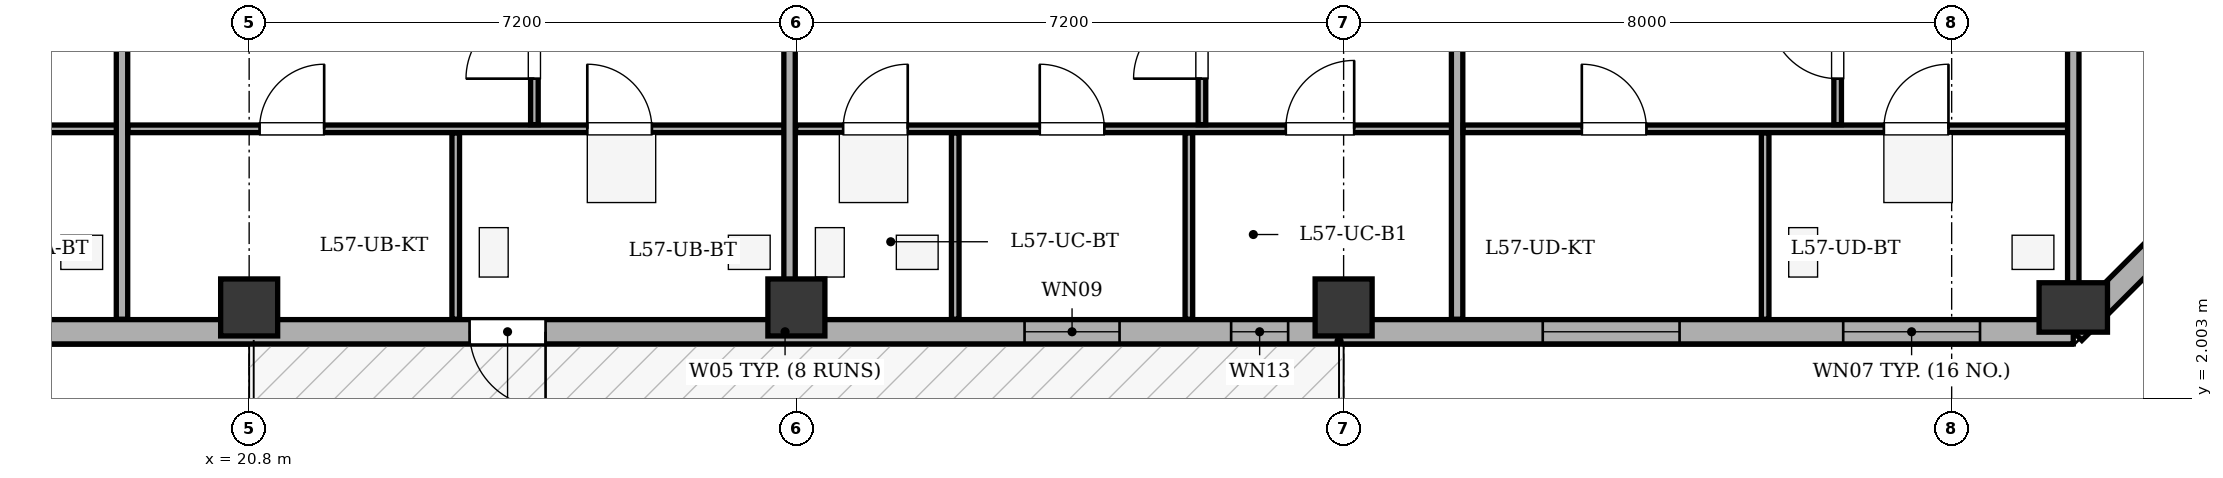
"""IFC4 building model, lengths in metres.
Left out: names, types, materials, properties, quantities, classifications, styles, units other than length and angle.
Written with IfcOpenShell. Run it as: python <this file> out.ifc"""

import sys

from ifc_helpers import new_model, si_unit, direction, frame, frame_2d, origin, origin_2d, place, context, subcontext, project, spatial, rectangle, extrude, element, fill, save


model = new_model("IFC4")
c1 = context("Model", 3, precision=1e-05, world=origin(), true_north=direction((0.0, 1.0)))
c2 = subcontext(c1, "Body", "Model", "MODEL_VIEW")
j1 = project(units=[si_unit("LENGTHUNIT", "METRE"), si_unit("PLANEANGLEUNIT", "RADIAN")], contexts=[c1])
p1 = place(None, origin())
s1 = spatial("IfcSite", under=j1, at=p1, CompositionType="ELEMENT")
p2 = place(p1, origin())
s2 = spatial("IfcBuilding", under=s1, at=p2, CompositionType="ELEMENT")
p3 = place(p2, frame((0.0, 0.0, 221.1)))
s3 = spatial("IfcBuildingStorey", under=s2, at=p3, CompositionType="ELEMENT", Elevation=221.1)
for number, where, z_axis, x_axis in (
    (1, (20.8, 3.2, 0.0), (0.0, 0.0, 1.0), (1.0, 0.0, 0.0)),
    (2, (28.0, 3.2, 0.0), (0.0, 0.0, 1.0), (1.0, 0.0, 0.0)),
    (3, (35.2, 3.2, 0.0), (0.0, 0.0, 1.0), (1.0, 0.0, 0.0)),
):
    element("IfcColumn", number, at=place(p3, frame(where, z_axis=z_axis, x_axis=x_axis)), inside=s3, PredefinedType="COLUMN", context=c2, shape_type="SweptSolid", body=[
        extrude(rectangle(XDim=0.75, YDim=0.75, at=origin_2d()), origin(), (0.0, 0.0, 1.0), 3.4),
    ])
p4 = place(p3, frame((44.8, 3.2, 0.0), z_axis=(0.0, 0.0, 1.0), x_axis=(1.0, 0.0, 0.0)))
e4 = element("IfcColumn", 4, at=p4, inside=s3, PredefinedType="COLUMN", context=c2, shape_type="SweptSolid", body=[
    extrude(rectangle(XDim=0.65, YDim=0.9, at=origin_2d()), origin(), (0.0, 0.0, 1.0), 3.4),
])
p5 = place(p3, frame((44.8, 2.88, 0.0), z_axis=(0.0, 0.0, 1.0), x_axis=(-1.0, 0.0, 0.0)))
e5 = element("IfcWall", 5, at=p5, inside=s3, PredefinedType="STANDARD", context=c2, shape_type="SweptSolid", body=[
    extrude(rectangle(XDim=36.0, YDim=0.32, at=frame_2d((18.0, 0.0))), origin(), (0.0, 0.0, 1.0), 2.725),
])
p6 = place(p5, frame((20.1, 0.0, 0.0)))
e6 = element("IfcOpeningElement", 6, at=p6, cuts=e5, PredefinedType="OPENING", context=c2, shape_type="SweptSolid", body=[
    extrude(rectangle(XDim=1.0, YDim=2.02, at=frame_2d((0.5, 1.01))), frame((0.0, 0.17, 0.0), z_axis=(0.0, -1.0, 0.0), x_axis=(1.0, 0.0, 0.0)), (0.0, 0.0, 1.0), 0.34),
])
p7 = place(p5, frame((1.227, 0.0, 0.75)))
e7 = element("IfcOpeningElement", 7, at=p7, cuts=e5, PredefinedType="OPENING", context=c2, shape_type="SweptSolid", body=[
    extrude(rectangle(XDim=1.8, YDim=1.7, at=frame_2d((0.9, 0.85))), frame((0.0, 0.17, 0.0), z_axis=(0.0, -1.0, 0.0), x_axis=(1.0, 0.0, 0.0)), (0.0, 0.0, 1.0), 0.34),
])
p8 = place(p5, frame((5.18, 0.0, 0.75)))
e8 = element("IfcOpeningElement", 8, at=p8, cuts=e5, PredefinedType="OPENING", context=c2, shape_type="SweptSolid", body=[
    extrude(rectangle(XDim=1.8, YDim=1.7, at=frame_2d((0.9, 0.85))), frame((0.0, 0.17, 0.0), z_axis=(0.0, -1.0, 0.0), x_axis=(1.0, 0.0, 0.0)), (0.0, 0.0, 1.0), 0.34),
])
p9 = place(p5, frame((12.548, 0.0, 0.75)))
e9 = element("IfcOpeningElement", 9, at=p9, cuts=e5, PredefinedType="OPENING", context=c2, shape_type="SweptSolid", body=[
    extrude(rectangle(XDim=1.25, YDim=1.7, at=frame_2d((0.625, 0.85))), frame((0.0, 0.17, 0.0), z_axis=(0.0, -1.0, 0.0), x_axis=(1.0, 0.0, 0.0)), (0.0, 0.0, 1.0), 0.34),
])
p10 = place(p5, frame((26.8, 0.0, 0.75)))
e10 = element("IfcOpeningElement", 10, at=p10, cuts=e5, PredefinedType="OPENING", context=c2, shape_type="SweptSolid", body=[
    extrude(rectangle(XDim=1.8, YDim=1.7, at=frame_2d((0.9, 0.85))), frame((0.0, 0.17, 0.0), z_axis=(0.0, -1.0, 0.0), x_axis=(1.0, 0.0, 0.0)), (0.0, 0.0, 1.0), 0.34),
])
p11 = place(p5, frame((30.854, 0.0, 0.75)))
e11 = element("IfcOpeningElement", 11, at=p11, cuts=e5, PredefinedType="OPENING", context=c2, shape_type="SweptSolid", body=[
    extrude(rectangle(XDim=1.8, YDim=1.7, at=frame_2d((0.9, 0.85))), frame((0.0, 0.17, 0.0), z_axis=(0.0, -1.0, 0.0), x_axis=(1.0, 0.0, 0.0)), (0.0, 0.0, 1.0), 0.34),
])
p12 = place(p5, frame((10.33, 0.0, 0.75)))
e12 = element("IfcOpeningElement", 12, at=p12, cuts=e5, PredefinedType="OPENING", context=c2, shape_type="SweptSolid", body=[
    extrude(rectangle(XDim=0.75, YDim=1.45, at=frame_2d((0.375, 0.725))), frame((0.0, 0.17, 0.0), z_axis=(0.0, -1.0, 0.0), x_axis=(1.0, 0.0, 0.0)), (0.0, 0.0, 1.0), 0.34),
])
p13 = place(p3, frame((49.12, 7.2, 0.0), z_axis=(0.0, 0.0, 1.0), x_axis=(-0.707106781187, -0.707106781187, 0.0)))
e13 = element("IfcWall", 13, at=p13, inside=s3, PredefinedType="STANDARD", context=c2, shape_type="SweptSolid", body=[
    extrude(rectangle(XDim=6.11, YDim=0.32, at=frame_2d((3.055, 0.0))), origin(), (0.0, 0.0, 1.0), 2.725),
])
p14 = place(p13, frame((2.355, 0.0, 0.75)))
e14 = element("IfcOpeningElement", 14, at=p14, cuts=e13, PredefinedType="OPENING", context=c2, shape_type="SweptSolid", body=[
    extrude(rectangle(XDim=1.4, YDim=1.65, at=frame_2d((0.7, 0.825))), frame((0.0, 0.17, 0.0), z_axis=(0.0, -1.0, 0.0), x_axis=(1.0, 0.0, 0.0)), (0.0, 0.0, 1.0), 0.34),
])
p15 = place(p3, frame((11.1, 5.55, 0.0), z_axis=(0.0, 0.0, 1.0), x_axis=(1.0, 0.0, 0.0)))
e15 = element("IfcWall", 15, at=p15, inside=s3, PredefinedType="PARTITIONING", context=c2, shape_type="SweptSolid", body=[
    extrude(rectangle(XDim=8.067, YDim=0.1, at=frame_2d((4.033, 0.0))), origin(), (0.0, 0.0, 1.0), 3.1),
])
p16 = place(p15, frame((1.562, 0.0, 0.0)))
e16 = element("IfcOpeningElement", 16, at=p16, cuts=e15, PredefinedType="OPENING", context=c2, shape_type="SweptSolid", body=[
    extrude(rectangle(XDim=0.85, YDim=2.05, at=frame_2d((0.425, 1.025))), frame((0.0, 0.06, 0.0), z_axis=(0.0, -1.0, 0.0), x_axis=(1.0, 0.0, 0.0)), (0.0, 0.0, 1.0), 0.12),
])
p17 = place(p15, frame((5.535, 0.0, 0.0)))
e17 = element("IfcOpeningElement", 17, at=p17, cuts=e15, PredefinedType="OPENING", context=c2, shape_type="SweptSolid", body=[
    extrude(rectangle(XDim=0.85, YDim=2.05, at=frame_2d((0.425, 1.025))), frame((0.0, 0.06, 0.0), z_axis=(0.0, -1.0, 0.0), x_axis=(1.0, 0.0, 0.0)), (0.0, 0.0, 1.0), 0.12),
])
p18 = place(p3, frame((19.127, 3.045, 0.0), z_axis=(0.0, 0.0, 1.0), x_axis=(0.0, 1.0, 0.0)))
e18 = element("IfcWall", 18, at=p18, inside=s3, PredefinedType="PARTITIONING", context=c2, shape_type="SweptSolid", body=[
    extrude(rectangle(XDim=15.255, YDim=0.15, at=frame_2d((7.627, 0.0))), origin(), (0.0, 0.0, 1.0), 3.1),
])
p19 = place(p3, frame((19.207, 5.55, 0.0), z_axis=(0.0, 0.0, 1.0), x_axis=(1.0, 0.0, 0.0)))
e19 = element("IfcWall", 19, at=p19, inside=s3, PredefinedType="PARTITIONING", context=c2, shape_type="SweptSolid", body=[
    extrude(rectangle(XDim=8.743, YDim=0.1, at=frame_2d((4.372, 0.0))), origin(), (0.0, 0.0, 1.0), 3.1),
])
p20 = place(p19, frame((1.73, 0.0, 0.0)))
e20 = element("IfcOpeningElement", 20, at=p20, cuts=e19, PredefinedType="OPENING", context=c2, shape_type="SweptSolid", body=[
    extrude(rectangle(XDim=0.85, YDim=2.05, at=frame_2d((0.425, 1.025))), frame((0.0, 0.06, 0.0), z_axis=(0.0, -1.0, 0.0), x_axis=(1.0, 0.0, 0.0)), (0.0, 0.0, 1.0), 0.12),
])
p21 = place(p19, frame((6.042, 0.0, 0.0)))
e21 = element("IfcOpeningElement", 21, at=p21, cuts=e19, PredefinedType="OPENING", context=c2, shape_type="SweptSolid", body=[
    extrude(rectangle(XDim=0.85, YDim=2.05, at=frame_2d((0.425, 1.025))), frame((0.0, 0.06, 0.0), z_axis=(0.0, -1.0, 0.0), x_axis=(1.0, 0.0, 0.0)), (0.0, 0.0, 1.0), 0.12),
])
p22 = place(p3, frame((24.553, 5.605, 0.0), z_axis=(0.0, 0.0, 1.0), x_axis=(0.0, 1.0, 0.0)))
e22 = element("IfcWall", 22, at=p22, inside=s3, PredefinedType="PARTITIONING", context=c2, shape_type="SweptSolid", body=[
    extrude(rectangle(XDim=12.695, YDim=0.1, at=frame_2d((6.348, 0.0))), origin(), (0.0, 0.0, 1.0), 3.1),
])
p23 = place(p22, frame((0.605, 0.0, 0.0)))
e23 = element("IfcOpeningElement", 23, at=p23, cuts=e22, PredefinedType="OPENING", context=c2, shape_type="SweptSolid", body=[
    extrude(rectangle(XDim=0.9, YDim=2.05, at=frame_2d((0.45, 1.025))), frame((0.0, 0.06, 0.0), z_axis=(0.0, -1.0, 0.0), x_axis=(1.0, 0.0, 0.0)), (0.0, 0.0, 1.0), 0.12),
])
p24 = place(p3, frame((23.518, 3.045, 0.0), z_axis=(0.0, 0.0, 1.0), x_axis=(0.0, 1.0, 0.0)))
e24 = element("IfcWall", 24, at=p24, inside=s3, PredefinedType="PARTITIONING", context=c2, shape_type="SweptSolid", body=[
    extrude(rectangle(XDim=2.45, YDim=0.1, at=frame_2d((1.225, 0.0))), origin(), (0.0, 0.0, 1.0), 3.1),
])
p25 = place(p3, frame((27.91, 3.045, 0.0), z_axis=(0.0, 0.0, 1.0), x_axis=(0.0, 1.0, 0.0)))
e25 = element("IfcWall", 25, at=p25, inside=s3, PredefinedType="PARTITIONING", context=c2, shape_type="SweptSolid", body=[
    extrude(rectangle(XDim=15.255, YDim=0.15, at=frame_2d((7.627, 0.0))), origin(), (0.0, 0.0, 1.0), 2.535),
])
p26 = place(p3, frame((27.99, 5.55, 0.0), z_axis=(0.0, 0.0, 1.0), x_axis=(1.0, 0.0, 0.0)))
e26 = element("IfcWall", 26, at=p26, inside=s3, PredefinedType="PARTITIONING", context=c2, shape_type="SweptSolid", body=[
    extrude(rectangle(XDim=8.743, YDim=0.1, at=frame_2d((4.372, 0.0))), origin(), (0.0, 0.0, 1.0), 3.1),
])
p27 = place(p26, frame((0.625, 0.0, 0.0)))
e27 = element("IfcOpeningElement", 27, at=p27, cuts=e26, PredefinedType="OPENING", context=c2, shape_type="SweptSolid", body=[
    extrude(rectangle(XDim=0.85, YDim=2.05, at=frame_2d((0.425, 1.025))), frame((0.0, 0.06, 0.0), z_axis=(0.0, -1.0, 0.0), x_axis=(1.0, 0.0, 0.0)), (0.0, 0.0, 1.0), 0.12),
])
p28 = place(p26, frame((3.212, 0.0, 0.0)))
e28 = element("IfcOpeningElement", 28, at=p28, cuts=e26, PredefinedType="OPENING", context=c2, shape_type="SweptSolid", body=[
    extrude(rectangle(XDim=0.85, YDim=2.05, at=frame_2d((0.425, 1.025))), frame((0.0, 0.06, 0.0), z_axis=(0.0, -1.0, 0.0), x_axis=(1.0, 0.0, 0.0)), (0.0, 0.0, 1.0), 0.12),
])
p29 = place(p26, frame((6.449, 0.0, 0.0)))
e29 = element("IfcOpeningElement", 29, at=p29, cuts=e26, PredefinedType="OPENING", context=c2, shape_type="SweptSolid", body=[
    extrude(rectangle(XDim=0.9, YDim=2.05, at=frame_2d((0.45, 1.025))), frame((0.0, 0.06, 0.0), z_axis=(0.0, -1.0, 0.0), x_axis=(1.0, 0.0, 0.0)), (0.0, 0.0, 1.0), 0.12),
])
p30 = place(p3, frame((33.336, 5.605, 0.0), z_axis=(0.0, 0.0, 1.0), x_axis=(0.0, 1.0, 0.0)))
e30 = element("IfcWall", 30, at=p30, inside=s3, PredefinedType="PARTITIONING", context=c2, shape_type="SweptSolid", body=[
    extrude(rectangle(XDim=12.695, YDim=0.1, at=frame_2d((6.348, 0.0))), origin(), (0.0, 0.0, 1.0), 3.1),
])
p31 = place(p30, frame((0.605, 0.0, 0.0)))
e31 = element("IfcOpeningElement", 31, at=p31, cuts=e30, PredefinedType="OPENING", context=c2, shape_type="SweptSolid", body=[
    extrude(rectangle(XDim=0.9, YDim=2.05, at=frame_2d((0.45, 1.025))), frame((0.0, 0.06, 0.0), z_axis=(0.0, -1.0, 0.0), x_axis=(1.0, 0.0, 0.0)), (0.0, 0.0, 1.0), 0.12),
])
for number, where, z_axis, x_axis in (
    (32, (30.09, 3.045, 0.0), (0.0, 0.0, 1.0), (0.0, 1.0, 0.0)),
    (33, (33.164, 3.045, 0.0), (0.0, 0.0, 1.0), (0.0, 1.0, 0.0)),
):
    element("IfcWall", number, at=place(p3, frame(where, z_axis=z_axis, x_axis=x_axis)), inside=s3, PredefinedType="PARTITIONING", context=c2, shape_type="SweptSolid", body=[
        extrude(rectangle(XDim=2.45, YDim=0.1, at=frame_2d((1.225, 0.0))), origin(), (0.0, 0.0, 1.0), 3.1),
    ])
p32 = place(p3, frame((36.693, 3.045, 0.0), z_axis=(0.0, 0.0, 1.0), x_axis=(0.0, 1.0, 0.0)))
e34 = element("IfcWall", 34, at=p32, inside=s3, PredefinedType="PARTITIONING", context=c2, shape_type="SweptSolid", body=[
    extrude(rectangle(XDim=15.255, YDim=0.15, at=frame_2d((7.627, 0.0))), origin(), (0.0, 0.0, 1.0), 2.725),
])
p33 = place(p3, frame((36.773, 5.55, 0.0), z_axis=(0.0, 0.0, 1.0), x_axis=(1.0, 0.0, 0.0)))
e35 = element("IfcWall", 35, at=p33, inside=s3, PredefinedType="PARTITIONING", context=c2, shape_type="SweptSolid", body=[
    extrude(rectangle(XDim=8.067, YDim=0.1, at=frame_2d((4.034, 0.0))), origin(), (0.0, 0.0, 1.0), 3.1),
])
p34 = place(p33, frame((1.561, 0.0, 0.0)))
e36 = element("IfcOpeningElement", 36, at=p34, cuts=e35, PredefinedType="OPENING", context=c2, shape_type="SweptSolid", body=[
    extrude(rectangle(XDim=0.85, YDim=2.05, at=frame_2d((0.425, 1.025))), frame((0.0, 0.06, 0.0), z_axis=(0.0, -1.0, 0.0), x_axis=(1.0, 0.0, 0.0)), (0.0, 0.0, 1.0), 0.12),
])
p35 = place(p33, frame((5.535, 0.0, 0.0)))
e37 = element("IfcOpeningElement", 37, at=p35, cuts=e35, PredefinedType="OPENING", context=c2, shape_type="SweptSolid", body=[
    extrude(rectangle(XDim=0.85, YDim=2.05, at=frame_2d((0.425, 1.025))), frame((0.0, 0.06, 0.0), z_axis=(0.0, -1.0, 0.0), x_axis=(1.0, 0.0, 0.0)), (0.0, 0.0, 1.0), 0.12),
])
p36 = place(p3, frame((41.7, 5.605, 0.0), z_axis=(0.0, 0.0, 1.0), x_axis=(0.0, 1.0, 0.0)))
e38 = element("IfcWall", 38, at=p36, inside=s3, PredefinedType="PARTITIONING", context=c2, shape_type="SweptSolid", body=[
    extrude(rectangle(XDim=12.695, YDim=0.1, at=frame_2d((6.348, 0.0))), origin(), (0.0, 0.0, 1.0), 3.1),
])
p37 = place(p36, frame((0.605, 0.0, 0.0)))
e39 = element("IfcOpeningElement", 39, at=p37, cuts=e38, PredefinedType="OPENING", context=c2, shape_type="SweptSolid", body=[
    extrude(rectangle(XDim=0.9, YDim=2.05, at=frame_2d((0.45, 1.025))), frame((0.0, 0.06, 0.0), z_axis=(0.0, -1.0, 0.0), x_axis=(1.0, 0.0, 0.0)), (0.0, 0.0, 1.0), 0.12),
])
p38 = place(p3, frame((40.746, 3.045, 0.0), z_axis=(0.0, 0.0, 1.0), x_axis=(0.0, 1.0, 0.0)))
e40 = element("IfcWall", 40, at=p38, inside=s3, PredefinedType="PARTITIONING", context=c2, shape_type="SweptSolid", body=[
    extrude(rectangle(XDim=2.45, YDim=0.1, at=frame_2d((1.225, 0.0))), origin(), (0.0, 0.0, 1.0), 3.1),
])
p39 = place(p3, frame((44.8, 3.045, 0.0), z_axis=(0.0, 0.0, 1.0), x_axis=(0.0, 1.0, 0.0)))
e41 = element("IfcWall", 41, at=p39, inside=s3, PredefinedType="PARTITIONING", context=c2, shape_type="SweptSolid", body=[
    extrude(rectangle(XDim=15.255, YDim=0.15, at=frame_2d((7.627, 0.0))), origin(), (0.0, 0.0, 1.0), 3.1),
])
p40 = place(p6, origin())
e42 = element("IfcDoor", 42, at=p40, inside=s3, OperationType="SINGLE_SWING_LEFT", PredefinedType="DOOR", context=c2, shape_type="SweptSolid", body=[
    extrude(rectangle(XDim=1.0, YDim=2.02, at=frame_2d((0.5, 1.01))), frame((0.0, 0.025, 0.0), z_axis=(0.0, -1.0, 0.0), x_axis=(1.0, 0.0, 0.0)), (0.0, 0.0, 1.0), 0.05),
])
fill(e6, e42)
p41 = place(p7, origin())
e43 = element("IfcWindow", 43, at=p41, inside=s3, PartitioningType="SINGLE_PANEL", PredefinedType="WINDOW", context=c2, shape_type="SweptSolid", body=[
    extrude(rectangle(XDim=1.8, YDim=1.7, at=frame_2d((0.9, 0.85))), frame((0.0, -0.01, 0.0), z_axis=(0.0, -1.0, 0.0), x_axis=(1.0, 0.0, 0.0)), (0.0, 0.0, 1.0), 0.06),
])
fill(e7, e43)
p42 = place(p8, origin())
e44 = element("IfcWindow", 44, at=p42, inside=s3, PartitioningType="SINGLE_PANEL", PredefinedType="WINDOW", context=c2, shape_type="SweptSolid", body=[
    extrude(rectangle(XDim=1.8, YDim=1.7, at=frame_2d((0.9, 0.85))), frame((0.0, -0.01, 0.0), z_axis=(0.0, -1.0, 0.0), x_axis=(1.0, 0.0, 0.0)), (0.0, 0.0, 1.0), 0.06),
])
fill(e8, e44)
p43 = place(p9, origin())
e45 = element("IfcWindow", 45, at=p43, inside=s3, PartitioningType="SINGLE_PANEL", PredefinedType="WINDOW", context=c2, shape_type="SweptSolid", body=[
    extrude(rectangle(XDim=1.25, YDim=1.7, at=frame_2d((0.625, 0.85))), frame((0.0, -0.01, 0.0), z_axis=(0.0, -1.0, 0.0), x_axis=(1.0, 0.0, 0.0)), (0.0, 0.0, 1.0), 0.06),
])
fill(e9, e45)
p44 = place(p12, origin())
e46 = element("IfcWindow", 46, at=p44, inside=s3, PartitioningType="SINGLE_PANEL", PredefinedType="WINDOW", context=c2, shape_type="SweptSolid", body=[
    extrude(rectangle(XDim=0.75, YDim=1.45, at=frame_2d((0.375, 0.725))), frame((0.0, -0.01, 0.0), z_axis=(0.0, -1.0, 0.0), x_axis=(1.0, 0.0, 0.0)), (0.0, 0.0, 1.0), 0.06),
])
fill(e12, e46)
p45 = place(p23, origin())
e47 = element("IfcDoor", 47, at=p45, inside=s3, OperationType="SINGLE_SWING_LEFT", PredefinedType="DOOR", context=c2, shape_type="SweptSolid", body=[
    extrude(rectangle(XDim=0.9, YDim=2.05, at=frame_2d((0.45, 1.025))), frame((0.0, 0.025, 0.0), z_axis=(0.0, -1.0, 0.0), x_axis=(1.0, 0.0, 0.0)), (0.0, 0.0, 1.0), 0.05),
])
fill(e23, e47)
p46 = place(p20, origin())
e48 = element("IfcDoor", 48, at=p46, inside=s3, OperationType="SINGLE_SWING_RIGHT", PredefinedType="DOOR", context=c2, shape_type="SweptSolid", body=[
    extrude(rectangle(XDim=0.85, YDim=2.05, at=frame_2d((0.425, 1.025))), frame((0.0, 0.025, 0.0), z_axis=(0.0, -1.0, 0.0), x_axis=(1.0, 0.0, 0.0)), (0.0, 0.0, 1.0), 0.05),
])
fill(e20, e48)
p47 = place(p21, origin())
e49 = element("IfcDoor", 49, at=p47, inside=s3, OperationType="SINGLE_SWING_LEFT", PredefinedType="DOOR", context=c2, shape_type="SweptSolid", body=[
    extrude(rectangle(XDim=0.85, YDim=2.05, at=frame_2d((0.425, 1.025))), frame((0.0, 0.025, 0.0), z_axis=(0.0, -1.0, 0.0), x_axis=(1.0, 0.0, 0.0)), (0.0, 0.0, 1.0), 0.05),
])
fill(e21, e49)
p48 = place(p31, origin())
e50 = element("IfcDoor", 50, at=p48, inside=s3, OperationType="SINGLE_SWING_LEFT", PredefinedType="DOOR", context=c2, shape_type="SweptSolid", body=[
    extrude(rectangle(XDim=0.9, YDim=2.05, at=frame_2d((0.45, 1.025))), frame((0.0, 0.025, 0.0), z_axis=(0.0, -1.0, 0.0), x_axis=(1.0, 0.0, 0.0)), (0.0, 0.0, 1.0), 0.05),
])
fill(e31, e50)
p49 = place(p27, origin())
e51 = element("IfcDoor", 51, at=p49, inside=s3, OperationType="SINGLE_SWING_RIGHT", PredefinedType="DOOR", context=c2, shape_type="SweptSolid", body=[
    extrude(rectangle(XDim=0.85, YDim=2.05, at=frame_2d((0.425, 1.025))), frame((0.0, 0.025, 0.0), z_axis=(0.0, -1.0, 0.0), x_axis=(1.0, 0.0, 0.0)), (0.0, 0.0, 1.0), 0.05),
])
fill(e27, e51)
p50 = place(p28, origin())
e52 = element("IfcDoor", 52, at=p50, inside=s3, OperationType="SINGLE_SWING_LEFT", PredefinedType="DOOR", context=c2, shape_type="SweptSolid", body=[
    extrude(rectangle(XDim=0.85, YDim=2.05, at=frame_2d((0.425, 1.025))), frame((0.0, 0.025, 0.0), z_axis=(0.0, -1.0, 0.0), x_axis=(1.0, 0.0, 0.0)), (0.0, 0.0, 1.0), 0.05),
])
fill(e28, e52)
p51 = place(p29, origin())
e53 = element("IfcDoor", 53, at=p51, inside=s3, OperationType="SINGLE_SWING_RIGHT", PredefinedType="DOOR", context=c2, shape_type="SweptSolid", body=[
    extrude(rectangle(XDim=0.9, YDim=2.05, at=frame_2d((0.45, 1.025))), frame((0.0, 0.025, 0.0), z_axis=(0.0, -1.0, 0.0), x_axis=(1.0, 0.0, 0.0)), (0.0, 0.0, 1.0), 0.05),
])
fill(e29, e53)
p52 = place(p37, origin())
e54 = element("IfcDoor", 54, at=p52, inside=s3, OperationType="SINGLE_SWING_RIGHT", PredefinedType="DOOR", context=c2, shape_type="SweptSolid", body=[
    extrude(rectangle(XDim=0.9, YDim=2.05, at=frame_2d((0.45, 1.025))), frame((0.0, 0.025, 0.0), z_axis=(0.0, -1.0, 0.0), x_axis=(1.0, 0.0, 0.0)), (0.0, 0.0, 1.0), 0.05),
])
fill(e39, e54)
p53 = place(p34, origin())
e55 = element("IfcDoor", 55, at=p53, inside=s3, OperationType="SINGLE_SWING_LEFT", PredefinedType="DOOR", context=c2, shape_type="SweptSolid", body=[
    extrude(rectangle(XDim=0.85, YDim=2.05, at=frame_2d((0.425, 1.025))), frame((0.0, 0.025, 0.0), z_axis=(0.0, -1.0, 0.0), x_axis=(1.0, 0.0, 0.0)), (0.0, 0.0, 1.0), 0.05),
])
fill(e36, e55)
p54 = place(p35, origin())
e56 = element("IfcDoor", 56, at=p54, inside=s3, OperationType="SINGLE_SWING_RIGHT", PredefinedType="DOOR", context=c2, shape_type="SweptSolid", body=[
    extrude(rectangle(XDim=0.85, YDim=2.05, at=frame_2d((0.425, 1.025))), frame((0.0, 0.025, 0.0), z_axis=(0.0, -1.0, 0.0), x_axis=(1.0, 0.0, 0.0)), (0.0, 0.0, 1.0), 0.05),
])
fill(e37, e56)
save(model, sys.argv[1])
